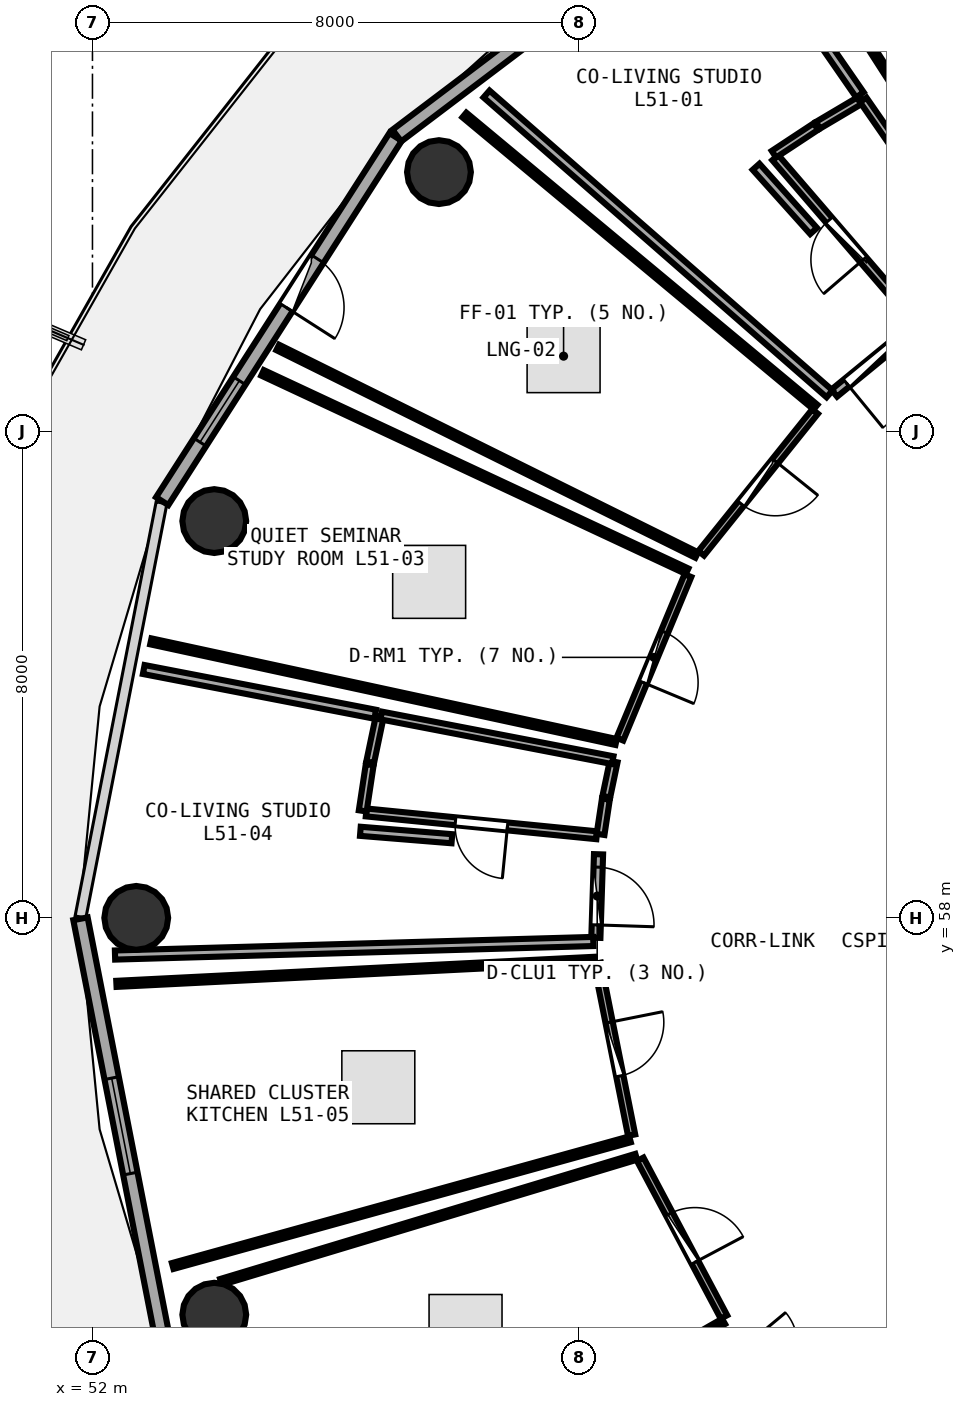
"""IFC4 building model, lengths in metres.
Left out: names, types, materials, properties, quantities, classifications, styles, units other than length and angle.
Written with IfcOpenShell. Run it as: python <this file> out.ifc"""

import sys

from ifc_helpers import new_model, si_unit, direction, frame, frame_2d, origin, origin_2d, place, context, subcontext, project, spatial, rectangle, circle, extrude, element, fill, save


model = new_model("IFC4")
c1 = context("Model", 3, precision=1e-05, world=origin(), true_north=direction((0.0, 1.0)))
c2 = subcontext(c1, "Body", "Model", "MODEL_VIEW")
j1 = project(units=[si_unit("LENGTHUNIT", "METRE"), si_unit("PLANEANGLEUNIT", "RADIAN")], contexts=[c1])
p1 = place(None, origin())
s1 = spatial("IfcSite", under=j1, at=p1, CompositionType="ELEMENT")
p2 = place(p1, origin())
s2 = spatial("IfcBuilding", under=s1, at=p2, CompositionType="ELEMENT")
p3 = place(p2, frame((0.0, 0.0, 200.7)))
s3 = spatial("IfcBuildingStorey", under=s2, at=p3, CompositionType="ELEMENT", Elevation=200.7)
for number, where, z_axis, x_axis in (
    (1, (57.698, 70.264, 0.0), (0.0, 0.0, 1.0), (1.0, 0.0, 0.0)),
    (2, (54.003, 64.526, 0.0), (0.0, 0.0, 1.0), (1.0, 0.0, 0.0)),
    (3, (52.72, 58.0, 0.0), (0.0, 0.0, 1.0), (1.0, 0.0, 0.0)),
    (4, (54.003, 51.474, 0.0), (0.0, 0.0, 1.0), (1.0, 0.0, 0.0)),
):
    element("IfcColumn", number, at=place(p3, frame(where, z_axis=z_axis, x_axis=x_axis)), inside=s3, PredefinedType="COLUMN", context=c2, shape_type="SweptSolid", body=[
        extrude(circle(Radius=0.525, at=origin_2d()), origin(), (0.0, 0.0, 1.0), 3.75),
    ])
p4 = place(p3, frame((62.888, 75.312, 0.0), z_axis=(0.0, 0.0, 1.0), x_axis=(-0.797701674595, -0.603052268338, 0.0)))
e5 = element("IfcWall", 5, at=p4, inside=s3, PredefinedType="SOLIDWALL", context=c2, shape_type="SweptSolid", body=[
    extrude(rectangle(XDim=7.374, YDim=0.24, at=frame_2d((3.687, 0.0))), origin(), (0.0, 0.0, 1.0), 3.475),
])
p5 = place(p4, frame((2.887, 0.0, 0.85)))
e6 = element("IfcOpeningElement", 6, at=p5, cuts=e5, PredefinedType="OPENING", context=c2, shape_type="SweptSolid", body=[
    extrude(rectangle(XDim=1.6, YDim=1.45, at=frame_2d((0.8, 0.725))), frame((0.0, 0.13, 0.0), z_axis=(0.0, -1.0, 0.0), x_axis=(1.0, 0.0, 0.0)), (0.0, 0.0, 1.0), 0.26),
])
p6 = place(p3, frame((56.986, 70.843, 0.0), z_axis=(0.0, 0.0, 1.0), x_axis=(-0.539539512973, -0.841960280501, 0.0)))
e7 = element("IfcWall", 7, at=p6, inside=s3, PredefinedType="SOLIDWALL", context=c2, shape_type="SweptSolid", body=[
    extrude(rectangle(XDim=7.115, YDim=0.24, at=frame_2d((3.557, 0.0))), origin(), (0.0, 0.0, 1.0), 3.475),
])
p7 = place(p6, frame((2.382, 0.0, 0.0)))
e8 = element("IfcOpeningElement", 8, at=p7, cuts=e7, PredefinedType="OPENING", context=c2, shape_type="SweptSolid", body=[
    extrude(rectangle(XDim=0.95, YDim=2.1, at=frame_2d((0.475, 1.05))), frame((0.0, 0.13, 0.0), z_axis=(0.0, -1.0, 0.0), x_axis=(1.0, 0.0, 0.0)), (0.0, 0.0, 1.0), 0.26),
])
p8 = place(p6, frame((4.762, 0.0, 0.85)))
e9 = element("IfcOpeningElement", 9, at=p8, cuts=e7, PredefinedType="OPENING", context=c2, shape_type="SweptSolid", body=[
    extrude(rectangle(XDim=1.2, YDim=1.45, at=frame_2d((0.6, 0.725))), frame((0.0, 0.13, 0.0), z_axis=(0.0, -1.0, 0.0), x_axis=(1.0, 0.0, 0.0)), (0.0, 0.0, 1.0), 0.26),
])
p9 = place(p3, frame((51.803, 57.985, 0.0), z_axis=(0.0, 0.0, 1.0), x_axis=(0.192069055673, -0.981381413036, 0.0)))
e10 = element("IfcWall", 10, at=p9, inside=s3, PredefinedType="SOLIDWALL", context=c2, shape_type="SweptSolid", body=[
    extrude(rectangle(XDim=6.94, YDim=0.24, at=frame_2d((3.47, 0.0))), origin(), (0.0, 0.0, 1.0), 3.475),
])
p10 = place(p9, frame((2.67, 0.0, 0.85)))
e11 = element("IfcOpeningElement", 11, at=p10, cuts=e10, PredefinedType="OPENING", context=c2, shape_type="SweptSolid", body=[
    extrude(rectangle(XDim=1.6, YDim=1.45, at=frame_2d((0.8, 0.725))), frame((0.0, 0.13, 0.0), z_axis=(0.0, -1.0, 0.0), x_axis=(1.0, 0.0, 0.0)), (0.0, 0.0, 1.0), 0.26),
])
p11 = place(p3, frame((65.56, 67.798, 0.0), z_axis=(0.0, 0.0, 1.0), x_axis=(-0.652591857515, 0.757709619515, 0.0)))
e12 = element("IfcWall", 12, at=p11, inside=s3, PredefinedType="PLUMBINGWALL", context=c2, shape_type="SweptSolid", body=[
    extrude(rectangle(XDim=3.57, YDim=0.13, at=frame_2d((1.785, 0.0))), origin(), (0.0, 0.0, 1.0), 3.025),
])
p12 = place(p11, frame((1.355, 0.0, 0.0)))
e13 = element("IfcOpeningElement", 13, at=p12, cuts=e12, PredefinedType="OPENING", context=c2, shape_type="SweptSolid", body=[
    extrude(rectangle(XDim=0.86, YDim=2.05, at=frame_2d((0.43, 1.025))), frame((0.0, 0.075, 0.0), z_axis=(0.0, -1.0, 0.0), x_axis=(1.0, 0.0, 0.0)), (0.0, 0.0, 1.0), 0.15),
])
p13 = place(p3, frame((65.336, 67.561, 0.0), z_axis=(0.0, 0.0, 1.0), x_axis=(-0.773453544763, -0.633852990917, 0.0)))
e14 = element("IfcWall", 14, at=p13, inside=s3, PredefinedType="PARTITIONING", context=c2, shape_type="SweptSolid", body=[
    extrude(rectangle(XDim=1.469, YDim=0.15, at=frame_2d((0.734, 0.0))), origin(), (0.0, 0.0, 1.0), 3.025),
])
p14 = place(p13, frame((0.259, 0.0, 0.0)))
e15 = element("IfcOpeningElement", 15, at=p14, cuts=e14, PredefinedType="OPENING", context=c2, shape_type="SweptSolid", body=[
    extrude(rectangle(XDim=0.95, YDim=2.08, at=frame_2d((0.475, 1.04))), frame((0.0, 0.085, 0.0), z_axis=(0.0, -1.0, 0.0), x_axis=(1.0, 0.0, 0.0)), (0.0, 0.0, 1.0), 0.17),
])
p15 = place(p3, frame((63.885, 66.327, 0.0), z_axis=(0.0, 0.0, 1.0), x_axis=(-0.626276824741, -0.779600756023, 0.0)))
e16 = element("IfcWall", 16, at=p15, inside=s3, PredefinedType="PARTITIONING", context=c2, shape_type="SweptSolid", body=[
    extrude(rectangle(XDim=2.99, YDim=0.12, at=frame_2d((1.495, 0.0))), origin(), (0.0, 0.0, 1.0), 3.025),
])
p16 = place(p15, frame((1.045, 0.0, 0.0)))
e17 = element("IfcOpeningElement", 17, at=p16, cuts=e16, PredefinedType="OPENING", context=c2, shape_type="SweptSolid", body=[
    extrude(rectangle(XDim=0.9, YDim=2.08, at=frame_2d((0.45, 1.04))), frame((0.0, 0.07, 0.0), z_axis=(0.0, -1.0, 0.0), x_axis=(1.0, 0.0, 0.0)), (0.0, 0.0, 1.0), 0.14),
])
p17 = place(p3, frame((61.793, 63.629, 0.0), z_axis=(0.0, 0.0, 1.0), x_axis=(-0.384145151494, -0.923272713007, 0.0)))
e18 = element("IfcWall", 18, at=p17, inside=s3, PredefinedType="PARTITIONING", context=c2, shape_type="SweptSolid", body=[
    extrude(rectangle(XDim=2.913, YDim=0.12, at=frame_2d((1.456, 0.0))), origin(), (0.0, 0.0, 1.0), 3.235),
])
p18 = place(p17, frame((1.006, 0.0, 0.0)))
e19 = element("IfcOpeningElement", 19, at=p18, cuts=e18, PredefinedType="OPENING", context=c2, shape_type="SweptSolid", body=[
    extrude(rectangle(XDim=0.9, YDim=2.08, at=frame_2d((0.45, 1.04))), frame((0.0, 0.07, 0.0), z_axis=(0.0, -1.0, 0.0), x_axis=(1.0, 0.0, 0.0)), (0.0, 0.0, 1.0), 0.14),
])
p19 = place(p3, frame((60.293, 59.359, 0.0), z_axis=(0.0, 0.0, 1.0), x_axis=(-0.995138182823, 0.098488563232, 0.0)))
e20 = element("IfcWall", 20, at=p19, inside=s3, PredefinedType="PLUMBINGWALL", context=c2, shape_type="SweptSolid", body=[
    extrude(rectangle(XDim=3.81, YDim=0.13, at=frame_2d((1.905, 0.0))), origin(), (0.0, 0.0, 1.0), 3.175),
])
p20 = place(p19, frame((1.475, 0.0, 0.0)))
e21 = element("IfcOpeningElement", 21, at=p20, cuts=e20, PredefinedType="OPENING", context=c2, shape_type="SweptSolid", body=[
    extrude(rectangle(XDim=0.86, YDim=2.05, at=frame_2d((0.43, 1.025))), frame((0.0, 0.075, 0.0), z_axis=(0.0, -1.0, 0.0), x_axis=(1.0, 0.0, 0.0)), (0.0, 0.0, 1.0), 0.15),
])
p21 = place(p3, frame((60.323, 59.046, 0.0), z_axis=(0.0, 0.0, 1.0), x_axis=(-0.032172559415, -0.999482329219, 0.0)))
e22 = element("IfcWall", 22, at=p21, inside=s3, PredefinedType="PARTITIONING", context=c2, shape_type="SweptSolid", body=[
    extrude(rectangle(XDim=1.374, YDim=0.15, at=frame_2d((0.687, 0.0))), origin(), (0.0, 0.0, 1.0), 3.025),
])
p22 = place(p21, frame((0.212, 0.0, 0.0)))
e23 = element("IfcOpeningElement", 23, at=p22, cuts=e22, PredefinedType="OPENING", context=c2, shape_type="SweptSolid", body=[
    extrude(rectangle(XDim=0.95, YDim=2.08, at=frame_2d((0.475, 1.04))), frame((0.0, 0.085, 0.0), z_axis=(0.0, -1.0, 0.0), x_axis=(1.0, 0.0, 0.0)), (0.0, 0.0, 1.0), 0.17),
])
p23 = place(p3, frame((60.303, 57.253, 0.0), z_axis=(0.0, 0.0, 1.0), x_axis=(0.195904296331, -0.980623019656, 0.0)))
e24 = element("IfcWall", 24, at=p23, inside=s3, PredefinedType="PARTITIONING", context=c2, shape_type="SweptSolid", body=[
    extrude(rectangle(XDim=2.881, YDim=0.12, at=frame_2d((1.441, 0.0))), origin(), (0.0, 0.0, 1.0), 3.48),
])
p24 = place(p23, frame((0.991, 0.0, 0.0)))
e25 = element("IfcOpeningElement", 25, at=p24, cuts=e24, PredefinedType="OPENING", context=c2, shape_type="SweptSolid", body=[
    extrude(rectangle(XDim=0.9, YDim=2.08, at=frame_2d((0.45, 1.04))), frame((0.0, 0.07, 0.0), z_axis=(0.0, -1.0, 0.0), x_axis=(1.0, 0.0, 0.0)), (0.0, 0.0, 1.0), 0.14),
])
p25 = place(p3, frame((61.009, 54.03, 0.0), z_axis=(0.0, 0.0, 1.0), x_axis=(0.468999166779, -0.883198608219, 0.0)))
e26 = element("IfcWall", 26, at=p25, inside=s3, PredefinedType="PARTITIONING", context=c2, shape_type="SweptSolid", body=[
    extrude(rectangle(XDim=2.936, YDim=0.12, at=frame_2d((1.468, 0.0))), origin(), (0.0, 0.0, 1.0), 3.235),
])
p26 = place(p25, frame((1.018, 0.0, 0.0)))
e27 = element("IfcOpeningElement", 27, at=p26, cuts=e26, PredefinedType="OPENING", context=c2, shape_type="SweptSolid", body=[
    extrude(rectangle(XDim=0.9, YDim=2.08, at=frame_2d((0.45, 1.04))), frame((0.0, 0.07, 0.0), z_axis=(0.0, -1.0, 0.0), x_axis=(1.0, 0.0, 0.0)), (0.0, 0.0, 1.0), 0.14),
])
p27 = place(p3, frame((67.113, 68.712, 0.0), z_axis=(0.0, 0.0, 1.0), x_axis=(-0.540224697902, 0.841520811256, 0.0)))
e28 = element("IfcWall", 28, at=p27, inside=s3, PredefinedType="PARTITIONING", context=c2, shape_type="SweptSolid", body=[
    extrude(rectangle(XDim=6.369, YDim=0.1, at=frame_2d((3.185, 0.0))), origin(), (0.0, 0.0, 1.0), 3.175),
])
p28 = place(p3, frame((63.208, 70.559, 0.0), z_axis=(0.0, 0.0, 1.0), x_axis=(0.835081531493, 0.550126199848, 0.0)))
e29 = element("IfcWall", 29, at=p28, inside=s3, PredefinedType="PLUMBINGWALL", context=c2, shape_type="SweptSolid", body=[
    extrude(rectangle(XDim=0.827, YDim=0.13, at=frame_2d((0.413, 0.0))), origin(), (0.0, 0.0, 1.0), 3.48),
])
p29 = place(p3, frame((63.932, 71.035, 0.0), z_axis=(0.0, 0.0, 1.0), x_axis=(0.860534659753, 0.509391891734, 0.0)))
e30 = element("IfcWall", 30, at=p29, inside=s3, PredefinedType="PLUMBINGWALL", context=c2, shape_type="SweptSolid", body=[
    extrude(rectangle(XDim=0.832, YDim=0.13, at=frame_2d((0.416, 0.0))), origin(), (0.0, 0.0, 1.0), 3.025),
])
p30 = place(p3, frame((64.677, 71.453, 0.0), z_axis=(0.0, 0.0, 1.0), x_axis=(0.569617686403, -0.821909782967, 0.0)))
e31 = element("IfcWall", 31, at=p30, inside=s3, PredefinedType="PLUMBINGWALL", context=c2, shape_type="SweptSolid", body=[
    extrude(rectangle(XDim=3.611, YDim=0.13, at=frame_2d((1.806, 0.0))), origin(), (0.0, 0.0, 1.0), 3.175),
])
p31 = place(p3, frame((64.123, 66.618, 0.0), z_axis=(0.0, 0.0, 1.0), x_axis=(-0.752988337425, 0.658033862124, 0.0)))
e32 = element("IfcWall", 32, at=p31, inside=s3, PredefinedType="PARTITIONING", context=c2, shape_type="SweptSolid", body=[
    extrude(rectangle(XDim=7.492, YDim=0.15, at=frame_2d((3.746, 0.0))), origin(), (0.0, 0.0, 1.0), 3.075),
])
p32 = place(p3, frame((62.566, 74.505, 0.0), z_axis=(0.0, 0.0, 1.0), x_axis=(0.569125600833, -0.822250600776, 0.0)))
e33 = element("IfcWall", 33, at=p32, inside=s3, PredefinedType="PARTITIONING", context=c2, shape_type="SweptSolid", body=[
    extrude(rectangle(XDim=3.611, YDim=0.15, at=frame_2d((1.806, 0.0))), origin(), (0.0, 0.0, 1.0), 3.025),
])
p33 = place(p3, frame((62.914, 70.352, 0.0), z_axis=(0.0, 0.0, 1.0), x_axis=(0.667393587085, -0.744705176508, 0.0)))
e34 = element("IfcWall", 34, at=p33, inside=s3, PredefinedType="PARTITIONING", context=c2, shape_type="SweptSolid", body=[
    extrude(rectangle(XDim=1.418, YDim=0.15, at=frame_2d((0.709, 0.0))), origin(), (0.0, 0.0, 1.0), 3.175),
])
p34 = place(p3, frame((61.938, 63.967, 0.0), z_axis=(0.0, 0.0, 1.0), x_axis=(-0.896052906747, 0.443947281003, 0.0)))
e35 = element("IfcWall", 35, at=p34, inside=s3, PredefinedType="PARTITIONING", context=c2, shape_type="SweptSolid", body=[
    extrude(rectangle(XDim=7.691, YDim=0.1, at=frame_2d((3.845, 0.0))), origin(), (0.0, 0.0, 1.0), 3.025),
])
p35 = place(p3, frame((58.117, 71.203, 0.0), z_axis=(0.0, 0.0, 1.0), x_axis=(0.768764498043, -0.63953197461, 0.0)))
e36 = element("IfcWall", 36, at=p35, inside=s3, PredefinedType="PARTITIONING", context=c2, shape_type="SweptSolid", body=[
    extrude(rectangle(XDim=7.511, YDim=0.1, at=frame_2d((3.756, 0.0))), origin(), (0.0, 0.0, 1.0), 3.025),
])
p36 = place(p3, frame((60.612, 60.893, 0.0), z_axis=(0.0, 0.0, 1.0), x_axis=(-0.977397622815, 0.211409287676, 0.0)))
e37 = element("IfcWall", 37, at=p36, inside=s3, PredefinedType="PARTITIONING", context=c2, shape_type="SweptSolid", body=[
    extrude(rectangle(XDim=7.829, YDim=0.1, at=frame_2d((3.914, 0.0))), origin(), (0.0, 0.0, 1.0), 3.075),
])
p37 = place(p3, frame((54.797, 66.963, 0.0), z_axis=(0.0, 0.0, 1.0), x_axis=(0.906002589331, -0.423272144283, 0.0)))
e38 = element("IfcWall", 38, at=p37, inside=s3, PredefinedType="PARTITIONING", context=c2, shape_type="SweptSolid", body=[
    extrude(rectangle(XDim=7.707, YDim=0.1, at=frame_2d((3.854, 0.0))), origin(), (0.0, 0.0, 1.0), 3.025),
])
p38 = place(p3, frame((60.572, 60.57, 0.0), z_axis=(0.0, 0.0, 1.0), x_axis=(-0.205112412682, -0.978738421727, 0.0)))
e39 = element("IfcWall", 39, at=p38, inside=s3, PredefinedType="PLUMBINGWALL", context=c2, shape_type="SweptSolid", body=[
    extrude(rectangle(XDim=0.589, YDim=0.13, at=frame_2d((0.294, 0.0))), origin(), (0.0, 0.0, 1.0), 3.48),
])
p39 = place(p3, frame((60.444, 59.954, 0.0), z_axis=(0.0, 0.0, 1.0), x_axis=(-0.149903785265, -0.98870058924, 0.0)))
e40 = element("IfcWall", 40, at=p39, inside=s3, PredefinedType="PLUMBINGWALL", context=c2, shape_type="SweptSolid", body=[
    extrude(rectangle(XDim=0.588, YDim=0.13, at=frame_2d((0.294, 0.0))), origin(), (0.0, 0.0, 1.0), 3.48),
])
p40 = place(p3, frame((56.445, 59.76, 0.0), z_axis=(0.0, 0.0, 1.0), x_axis=(0.149504479532, 0.988761048282, 0.0)))
e41 = element("IfcWall", 41, at=p40, inside=s3, PredefinedType="PLUMBINGWALL", context=c2, shape_type="SweptSolid", body=[
    extrude(rectangle(XDim=0.769, YDim=0.13, at=frame_2d((0.385, 0.0))), origin(), (0.0, 0.0, 1.0), 3.48),
])
p41 = place(p3, frame((56.567, 60.56, 0.0), z_axis=(0.0, 0.0, 1.0), x_axis=(0.205018710415, 0.978758054056, 0.0)))
e42 = element("IfcWall", 42, at=p41, inside=s3, PredefinedType="PLUMBINGWALL", context=c2, shape_type="SweptSolid", body=[
    extrude(rectangle(XDim=0.769, YDim=0.13, at=frame_2d((0.385, 0.0))), origin(), (0.0, 0.0, 1.0), 3.48),
])
p42 = place(p3, frame((56.749, 61.328, 0.0), z_axis=(0.0, 0.0, 1.0), x_axis=(0.981906173962, -0.189368068941, 0.0)))
e43 = element("IfcWall", 43, at=p42, inside=s3, PredefinedType="PLUMBINGWALL", context=c2, shape_type="SweptSolid", body=[
    extrude(rectangle(XDim=3.878, YDim=0.13, at=frame_2d((1.939, 0.0))), origin(), (0.0, 0.0, 1.0), 3.175),
])
p43 = place(p3, frame((60.237, 57.612, 0.0), z_axis=(0.0, 0.0, 1.0), x_axis=(-0.999599617875, -0.028294945576, 0.0)))
e44 = element("IfcWall", 44, at=p43, inside=s3, PredefinedType="PARTITIONING", context=c2, shape_type="SweptSolid", body=[
    extrude(rectangle(XDim=7.869, YDim=0.15, at=frame_2d((3.935, 0.0))), origin(), (0.0, 0.0, 1.0), 3.075),
])
p44 = place(p3, frame((52.843, 62.084, 0.0), z_axis=(0.0, 0.0, 1.0), x_axis=(0.981831342876, -0.189755669601, 0.0)))
e45 = element("IfcWall", 45, at=p44, inside=s3, PredefinedType="PARTITIONING", context=c2, shape_type="SweptSolid", body=[
    extrude(rectangle(XDim=3.878, YDim=0.15, at=frame_2d((1.939, 0.0))), origin(), (0.0, 0.0, 1.0), 3.075),
])
p45 = place(p3, frame((56.406, 59.424, 0.0), z_axis=(0.0, 0.0, 1.0), x_axis=(0.996727287989, -0.080837574046, 0.0)))
e46 = element("IfcWall", 46, at=p45, inside=s3, PredefinedType="PARTITIONING", context=c2, shape_type="SweptSolid", body=[
    extrude(rectangle(XDim=1.51, YDim=0.15, at=frame_2d((0.755, 0.0))), origin(), (0.0, 0.0, 1.0), 3.48),
])
p46 = place(p3, frame((60.841, 54.358, 0.0), z_axis=(0.0, 0.0, 1.0), x_axis=(-0.963696964369, -0.266998428582, 0.0)))
e47 = element("IfcWall", 47, at=p46, inside=s3, PredefinedType="PARTITIONING", context=c2, shape_type="SweptSolid", body=[
    extrude(rectangle(XDim=7.804, YDim=0.1, at=frame_2d((3.902, 0.0))), origin(), (0.0, 0.0, 1.0), 3.075),
])
p47 = place(p3, frame((52.394, 56.915, 0.0), z_axis=(0.0, 0.0, 1.0), x_axis=(0.998738681635, 0.050210016992, 0.0)))
e48 = element("IfcWall", 48, at=p47, inside=s3, PredefinedType="PARTITIONING", context=c2, shape_type="SweptSolid", body=[
    extrude(rectangle(XDim=7.867, YDim=0.1, at=frame_2d((3.934, 0.0))), origin(), (0.0, 0.0, 1.0), 3.075),
])
p48 = place(p3, frame((62.379, 51.364, 0.0), z_axis=(0.0, 0.0, 1.0), x_axis=(-0.868127220156, -0.496341746808, 0.0)))
e49 = element("IfcWall", 49, at=p48, inside=s3, PredefinedType="PARTITIONING", context=c2, shape_type="SweptSolid", body=[
    extrude(rectangle(XDim=7.648, YDim=0.1, at=frame_2d((3.824, 0.0))), origin(), (0.0, 0.0, 1.0), 3.025),
])
p49 = place(p3, frame((54.114, 52.013, 0.0), z_axis=(0.0, 0.0, 1.0), x_axis=(0.957454305291, 0.288584915198, 0.0)))
e50 = element("IfcWall", 50, at=p49, inside=s3, PredefinedType="PARTITIONING", context=c2, shape_type="SweptSolid", body=[
    extrude(rectangle(XDim=7.133, YDim=0.1, at=frame_2d((3.566, 0.0))), origin(), (0.0, 0.0, 1.0), 3.075),
])
p50 = place(p7, frame((0.95, 0.0, 0.0), z_axis=(0.0, 0.0, 1.0), x_axis=(-1.0, 0.0, 0.0)))
e51 = element("IfcDoor", 51, at=p50, inside=s3, OperationType="SINGLE_SWING_LEFT", PredefinedType="DOOR", context=c2, shape_type="SweptSolid", body=[
    extrude(rectangle(XDim=0.95, YDim=2.1, at=frame_2d((0.475, 1.05))), frame((0.0, 0.025, 0.0), z_axis=(0.0, -1.0, 0.0), x_axis=(1.0, 0.0, 0.0)), (0.0, 0.0, 1.0), 0.05),
])
fill(e8, e51)
p51 = place(p8, origin())
e52 = element("IfcWindow", 52, at=p51, inside=s3, PartitioningType="SINGLE_PANEL", PredefinedType="WINDOW", context=c2, shape_type="SweptSolid", body=[
    extrude(rectangle(XDim=1.2, YDim=1.45, at=frame_2d((0.6, 0.725))), frame((0.0, 0.03, 0.0), z_axis=(0.0, -1.0, 0.0), x_axis=(1.0, 0.0, 0.0)), (0.0, 0.0, 1.0), 0.06),
])
fill(e9, e52)
p52 = place(p10, origin())
e53 = element("IfcWindow", 53, at=p52, inside=s3, PartitioningType="SINGLE_PANEL", PredefinedType="WINDOW", context=c2, shape_type="SweptSolid", body=[
    extrude(rectangle(XDim=1.6, YDim=1.45, at=frame_2d((0.8, 0.725))), frame((0.0, 0.03, 0.0), z_axis=(0.0, -1.0, 0.0), x_axis=(1.0, 0.0, 0.0)), (0.0, 0.0, 1.0), 0.06),
])
fill(e11, e53)
p53 = place(p12, origin())
e54 = element("IfcDoor", 54, at=p53, inside=s3, OperationType="SINGLE_SWING_LEFT", PredefinedType="DOOR", context=c2, shape_type="SweptSolid", body=[
    extrude(rectangle(XDim=0.86, YDim=2.05, at=frame_2d((0.43, 1.025))), frame((0.0, 0.025, 0.0), z_axis=(0.0, -1.0, 0.0), x_axis=(1.0, 0.0, 0.0)), (0.0, 0.0, 1.0), 0.05),
])
fill(e13, e54)
p54 = place(p14, origin())
e55 = element("IfcDoor", 55, at=p54, inside=s3, OperationType="SINGLE_SWING_RIGHT", PredefinedType="DOOR", context=c2, shape_type="SweptSolid", body=[
    extrude(rectangle(XDim=0.95, YDim=2.08, at=frame_2d((0.475, 1.04))), frame((0.0, 0.025, 0.0), z_axis=(0.0, -1.0, 0.0), x_axis=(1.0, 0.0, 0.0)), (0.0, 0.0, 1.0), 0.05),
])
fill(e15, e55)
p55 = place(p16, origin())
e56 = element("IfcDoor", 56, at=p55, inside=s3, OperationType="SINGLE_SWING_LEFT", PredefinedType="DOOR", context=c2, shape_type="SweptSolid", body=[
    extrude(rectangle(XDim=0.9, YDim=2.08, at=frame_2d((0.45, 1.04))), frame((0.0, 0.025, 0.0), z_axis=(0.0, -1.0, 0.0), x_axis=(1.0, 0.0, 0.0)), (0.0, 0.0, 1.0), 0.05),
])
fill(e17, e56)
p56 = place(p18, origin())
e57 = element("IfcDoor", 57, at=p56, inside=s3, OperationType="SINGLE_SWING_RIGHT", PredefinedType="DOOR", context=c2, shape_type="SweptSolid", body=[
    extrude(rectangle(XDim=0.9, YDim=2.08, at=frame_2d((0.45, 1.04))), frame((0.0, 0.025, 0.0), z_axis=(0.0, -1.0, 0.0), x_axis=(1.0, 0.0, 0.0)), (0.0, 0.0, 1.0), 0.05),
])
fill(e19, e57)
p57 = place(p20, origin())
e58 = element("IfcDoor", 58, at=p57, inside=s3, OperationType="SINGLE_SWING_LEFT", PredefinedType="DOOR", context=c2, shape_type="SweptSolid", body=[
    extrude(rectangle(XDim=0.86, YDim=2.05, at=frame_2d((0.43, 1.025))), frame((0.0, 0.025, 0.0), z_axis=(0.0, -1.0, 0.0), x_axis=(1.0, 0.0, 0.0)), (0.0, 0.0, 1.0), 0.05),
])
fill(e21, e58)
p58 = place(p22, origin())
e59 = element("IfcDoor", 59, at=p58, inside=s3, OperationType="SINGLE_SWING_RIGHT", PredefinedType="DOOR", context=c2, shape_type="SweptSolid", body=[
    extrude(rectangle(XDim=0.95, YDim=2.08, at=frame_2d((0.475, 1.04))), frame((0.0, 0.025, 0.0), z_axis=(0.0, -1.0, 0.0), x_axis=(1.0, 0.0, 0.0)), (0.0, 0.0, 1.0), 0.05),
])
fill(e23, e59)
p59 = place(p24, origin())
e60 = element("IfcDoor", 60, at=p59, inside=s3, OperationType="SINGLE_SWING_LEFT", PredefinedType="DOOR", context=c2, shape_type="SweptSolid", body=[
    extrude(rectangle(XDim=0.9, YDim=2.08, at=frame_2d((0.45, 1.04))), frame((0.0, 0.025, 0.0), z_axis=(0.0, -1.0, 0.0), x_axis=(1.0, 0.0, 0.0)), (0.0, 0.0, 1.0), 0.05),
])
fill(e25, e60)
p60 = place(p26, origin())
e61 = element("IfcDoor", 61, at=p60, inside=s3, OperationType="SINGLE_SWING_RIGHT", PredefinedType="DOOR", context=c2, shape_type="SweptSolid", body=[
    extrude(rectangle(XDim=0.9, YDim=2.08, at=frame_2d((0.45, 1.04))), frame((0.0, 0.025, 0.0), z_axis=(0.0, -1.0, 0.0), x_axis=(1.0, 0.0, 0.0)), (0.0, 0.0, 1.0), 0.05),
])
fill(e27, e61)
save(model, sys.argv[1])
